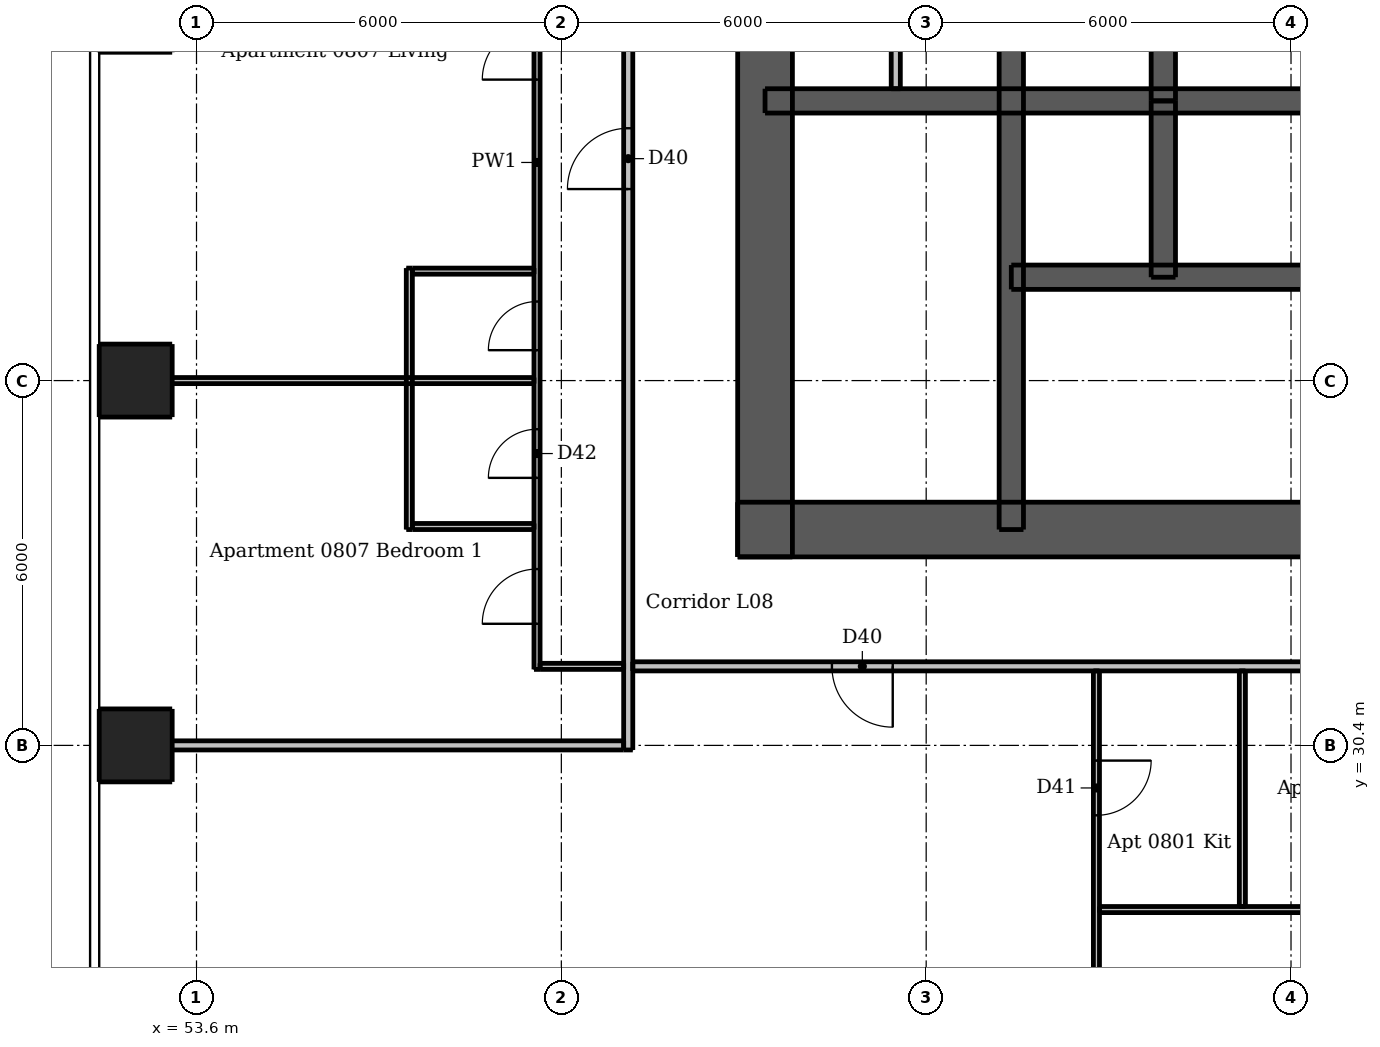
"""IFC4 building model, lengths in metres.
Left out: names, types, materials, properties, quantities, classifications, styles, units other than length and angle.
Written with IfcOpenShell. Run it as: python <this file> out.ifc"""

import sys

from ifc_helpers import new_model, si_unit, direction, frame, frame_2d, origin, origin_2d, place, context, subcontext, project, spatial, rectangle, extrude, element, fill, save


model = new_model("IFC4")
c1 = context("Model", 3, precision=1e-05, world=origin(), true_north=direction((0.0, 1.0)))
c2 = subcontext(c1, "Body", "Model", "MODEL_VIEW")
j1 = project(units=[si_unit("LENGTHUNIT", "METRE"), si_unit("PLANEANGLEUNIT", "RADIAN")], contexts=[c1])
p1 = place(None, origin())
s1 = spatial("IfcSite", under=j1, at=p1, CompositionType="ELEMENT")
p2 = place(p1, origin())
s2 = spatial("IfcBuilding", under=s1, at=p2, CompositionType="ELEMENT")
p3 = place(p2, frame((0.0, 0.0, 33.4)))
s3 = spatial("IfcBuildingStorey", under=s2, at=p3, CompositionType="ELEMENT", Elevation=33.4)
p4 = place(p3, frame((62.5, 33.95, 0.0), z_axis=(0.0, 0.0, 1.0), x_axis=(1.0, 0.0, 0.0)))
e1 = element("IfcWall", 1, at=p4, inside=s3, PredefinedType="SHEAR", context=c2, shape_type="SweptSolid", body=[
    extrude(rectangle(XDim=24.0, YDim=0.9, at=frame_2d((12.0, 0.0))), origin(), (0.0, 0.0, 1.0), 3.05),
])
p5 = place(p4, frame((2.05, 0.0, 0.0)))
e2 = element("IfcOpeningElement", 2, at=p5, cuts=e1, PredefinedType="OPENING", context=c2, shape_type="SweptSolid", body=[
    extrude(rectangle(XDim=1.1, YDim=2.1, at=frame_2d((0.55, 1.05))), frame((0.0, 0.46, 0.0), z_axis=(0.0, -1.0, 0.0), x_axis=(1.0, 0.0, 0.0)), (0.0, 0.0, 1.0), 0.92),
])
p6 = place(p4, frame((20.85, 0.0, 0.0)))
e3 = element("IfcOpeningElement", 3, at=p6, cuts=e1, PredefinedType="OPENING", context=c2, shape_type="SweptSolid", body=[
    extrude(rectangle(XDim=1.1, YDim=2.1, at=frame_2d((0.55, 1.05))), frame((0.0, 0.46, 0.0), z_axis=(0.0, -1.0, 0.0), x_axis=(1.0, 0.0, 0.0)), (0.0, 0.0, 1.0), 0.92),
])
p7 = place(p4, frame((8.0, 0.0, 0.0)))
e4 = element("IfcOpeningElement", 4, at=p7, cuts=e1, PredefinedType="OPENING", context=c2, shape_type="SweptSolid", body=[
    extrude(rectangle(XDim=1.1, YDim=2.1, at=frame_2d((0.55, 1.05))), frame((0.0, 0.46, 0.0), z_axis=(0.0, -1.0, 0.0), x_axis=(1.0, 0.0, 0.0)), (0.0, 0.0, 1.0), 0.92),
])
p8 = place(p4, frame((16.363, 0.0, 0.0)))
e5 = element("IfcOpeningElement", 5, at=p8, cuts=e1, PredefinedType="OPENING", context=c2, shape_type="SweptSolid", body=[
    extrude(rectangle(XDim=0.9, YDim=2.1, at=frame_2d((0.45, 1.05))), frame((0.0, 0.46, 0.0), z_axis=(0.0, -1.0, 0.0), x_axis=(1.0, 0.0, 0.0)), (0.0, 0.0, 1.0), 0.92),
])
p9 = place(p3, frame((62.95, 33.5, 0.0), z_axis=(0.0, 0.0, 1.0), x_axis=(0.0, 1.0, 0.0)))
e6 = element("IfcWall", 6, at=p9, inside=s3, PredefinedType="SHEAR", context=c2, shape_type="SweptSolid", body=[
    extrude(rectangle(XDim=24.0, YDim=0.9, at=frame_2d((12.0, 0.0))), origin(), (0.0, 0.0, 1.0), 3.05),
])
p10 = place(p9, frame((11.2, 0.0, 0.0)))
e7 = element("IfcOpeningElement", 7, at=p10, cuts=e6, PredefinedType="OPENING", context=c2, shape_type="SweptSolid", body=[
    extrude(rectangle(XDim=1.6, YDim=2.1, at=frame_2d((0.8, 1.05))), frame((0.0, 0.46, 0.0), z_axis=(0.0, -1.0, 0.0), x_axis=(1.0, 0.0, 0.0)), (0.0, 0.0, 1.0), 0.92),
])
p11 = place(p3, frame((62.95, 41.0, 0.0), z_axis=(0.0, 0.0, 1.0), x_axis=(1.0, 0.0, 0.0)))
e8 = element("IfcWall", 8, at=p11, inside=s3, PredefinedType="SHEAR", context=c2, shape_type="SweptSolid", body=[
    extrude(rectangle(XDim=23.1, YDim=0.4, at=frame_2d((11.55, 0.0))), origin(), (0.0, 0.0, 1.0), 3.05),
])
p12 = place(p3, frame((67.0, 33.95, 0.0), z_axis=(0.0, 0.0, 1.0), x_axis=(0.0, 1.0, 0.0)))
e9 = element("IfcWall", 9, at=p12, inside=s3, PredefinedType="SHEAR", context=c2, shape_type="SweptSolid", body=[
    extrude(rectangle(XDim=9.95, YDim=0.4, at=frame_2d((4.975, 0.0))), origin(), (0.0, 0.0, 1.0), 3.05),
])
p13 = place(p12, frame((0.65, 0.0, 0.0)))
e10 = element("IfcOpeningElement", 10, at=p13, cuts=e9, PredefinedType="OPENING", context=c2, shape_type="SweptSolid", body=[
    extrude(rectangle(XDim=1.1, YDim=2.1, at=frame_2d((0.55, 1.05))), frame((0.0, 0.21, 0.0), z_axis=(0.0, -1.0, 0.0), x_axis=(1.0, 0.0, 0.0)), (0.0, 0.0, 1.0), 0.42),
])
p14 = place(p3, frame((69.5, 41.0, 0.0), z_axis=(0.0, 0.0, 1.0), x_axis=(0.0, 1.0, 0.0)))
e11 = element("IfcWall", 11, at=p14, inside=s3, PredefinedType="SHEAR", context=c2, shape_type="SweptSolid", body=[
    extrude(rectangle(XDim=2.9, YDim=0.4, at=frame_2d((1.45, 0.0))), origin(), (0.0, 0.0, 1.0), 3.05),
])
p15 = place(p3, frame((67.0, 38.1, 0.0), z_axis=(0.0, 0.0, 1.0), x_axis=(1.0, 0.0, 0.0)))
e12 = element("IfcWall", 12, at=p15, inside=s3, PredefinedType="SHEAR", context=c2, shape_type="SweptSolid", body=[
    extrude(rectangle(XDim=7.5, YDim=0.4, at=frame_2d((3.75, 0.0))), origin(), (0.0, 0.0, 1.0), 3.05),
])
p16 = place(p15, frame((0.7, 0.0, 0.0)))
e13 = element("IfcOpeningElement", 13, at=p16, cuts=e12, PredefinedType="OPENING", context=c2, shape_type="SweptSolid", body=[
    extrude(rectangle(XDim=1.1, YDim=2.1, at=frame_2d((0.55, 1.05))), frame((0.0, 0.21, 0.0), z_axis=(0.0, -1.0, 0.0), x_axis=(1.0, 0.0, 0.0)), (0.0, 0.0, 1.0), 0.42),
])
p17 = place(p15, frame((3.2, 0.0, 0.0)))
e14 = element("IfcOpeningElement", 14, at=p17, cuts=e12, PredefinedType="OPENING", context=c2, shape_type="SweptSolid", body=[
    extrude(rectangle(XDim=1.1, YDim=2.1, at=frame_2d((0.55, 1.05))), frame((0.0, 0.21, 0.0), z_axis=(0.0, -1.0, 0.0), x_axis=(1.0, 0.0, 0.0)), (0.0, 0.0, 1.0), 0.42),
])
p18 = place(p15, frame((5.65, 0.0, 0.0)))
e15 = element("IfcOpeningElement", 15, at=p18, cuts=e12, PredefinedType="OPENING", context=c2, shape_type="SweptSolid", body=[
    extrude(rectangle(XDim=1.2, YDim=2.1, at=frame_2d((0.6, 1.05))), frame((0.0, 0.21, 0.0), z_axis=(0.0, -1.0, 0.0), x_axis=(1.0, 0.0, 0.0)), (0.0, 0.0, 1.0), 0.42),
])
p19 = place(p3, frame((69.5, 38.1, 0.0), z_axis=(0.0, 0.0, 1.0), x_axis=(0.0, 1.0, 0.0)))
e16 = element("IfcWall", 16, at=p19, inside=s3, PredefinedType="SHEAR", context=c2, shape_type="SweptSolid", body=[
    extrude(rectangle(XDim=2.9, YDim=0.4, at=frame_2d((1.45, 0.0))), origin(), (0.0, 0.0, 1.0), 3.05),
])
for number, where, z_axis, x_axis in (
    (17, (52.6, 30.4, 0.0), (0.0, 0.0, 1.0), (1.0, 0.0, 0.0)),
    (18, (52.6, 36.4, 0.0), (0.0, 0.0, 1.0), (1.0, 0.0, 0.0)),
    (19, (52.6, 42.4, 0.0), (0.0, 0.0, 1.0), (1.0, 0.0, 0.0)),
):
    element("IfcColumn", number, at=place(p3, frame(where, z_axis=z_axis, x_axis=x_axis)), inside=s3, PredefinedType="COLUMN", context=c2, shape_type="SweptSolid", body=[
        extrude(rectangle(XDim=1.2, YDim=1.2, at=origin_2d()), origin(), (0.0, 0.0, 1.0), 3.05),
    ])
p20 = place(p3, frame((65.1, 41.2, 0.0), z_axis=(0.0, 0.0, 1.0), x_axis=(0.0, 1.0, 0.0)))
e20 = element("IfcWall", 20, at=p20, inside=s3, PredefinedType="PLUMBINGWALL", context=c2, shape_type="SweptSolid", body=[
    extrude(rectangle(XDim=2.5, YDim=0.15, at=frame_2d((1.25, 0.0))), origin(), (0.0, 0.0, 1.0), 3.05),
])
p21 = place(p3, frame((57.1, 33.95, 0.0), z_axis=(0.0, 0.0, 1.0), x_axis=(0.0, 1.0, 0.0)))
e21 = element("IfcWall", 21, at=p21, inside=s3, PredefinedType="PARTITIONING", context=c2, shape_type="SweptSolid", body=[
    extrude(rectangle(XDim=4.3, YDim=0.1, at=frame_2d((2.15, 0.0))), origin(), (0.0, 0.0, 1.0), 3.05),
])
p22 = place(p3, frame((59.2, 31.65, 0.0), z_axis=(0.0, 0.0, 1.0), x_axis=(0.0, 1.0, 0.0)))
e22 = element("IfcWall", 22, at=p22, inside=s3, PredefinedType="PARTITIONING", context=c2, shape_type="SweptSolid", body=[
    extrude(rectangle(XDim=16.675, YDim=0.1, at=frame_2d((8.337, 0.0))), origin(), (0.0, 0.0, 1.0), 3.05),
])
p23 = place(p22, frame((9.7, 0.0, 0.0)))
e23 = element("IfcOpeningElement", 23, at=p23, cuts=e22, PredefinedType="OPENING", context=c2, shape_type="SweptSolid", body=[
    extrude(rectangle(XDim=0.9, YDim=2.1, at=frame_2d((0.45, 1.05))), frame((0.0, 0.06, 0.0), z_axis=(0.0, -1.0, 0.0), x_axis=(1.0, 0.0, 0.0)), (0.0, 0.0, 1.0), 0.12),
])
p24 = place(p22, frame((14.8, 0.0, 0.0)))
e24 = element("IfcOpeningElement", 24, at=p24, cuts=e22, PredefinedType="OPENING", context=c2, shape_type="SweptSolid", body=[
    extrude(rectangle(XDim=0.9, YDim=2.1, at=frame_2d((0.45, 1.05))), frame((0.0, 0.06, 0.0), z_axis=(0.0, -1.0, 0.0), x_axis=(1.0, 0.0, 0.0)), (0.0, 0.0, 1.0), 0.12),
])
p25 = place(p22, frame((5.25, 0.0, 0.0)))
e25 = element("IfcOpeningElement", 25, at=p25, cuts=e22, PredefinedType="OPENING", context=c2, shape_type="SweptSolid", body=[
    extrude(rectangle(XDim=0.8, YDim=2.1, at=frame_2d((0.4, 1.05))), frame((0.0, 0.06, 0.0), z_axis=(0.0, -1.0, 0.0), x_axis=(1.0, 0.0, 0.0)), (0.0, 0.0, 1.0), 0.12),
])
p26 = place(p22, frame((0.75, 0.0, 0.0)))
e26 = element("IfcOpeningElement", 26, at=p26, cuts=e22, PredefinedType="OPENING", context=c2, shape_type="SweptSolid", body=[
    extrude(rectangle(XDim=0.9, YDim=2.1, at=frame_2d((0.45, 1.05))), frame((0.0, 0.06, 0.0), z_axis=(0.0, -1.0, 0.0), x_axis=(1.0, 0.0, 0.0)), (0.0, 0.0, 1.0), 0.12),
])
p27 = place(p22, frame((3.15, 0.0, 0.0)))
e27 = element("IfcOpeningElement", 27, at=p27, cuts=e22, PredefinedType="OPENING", context=c2, shape_type="SweptSolid", body=[
    extrude(rectangle(XDim=0.8, YDim=2.1, at=frame_2d((0.4, 1.05))), frame((0.0, 0.06, 0.0), z_axis=(0.0, -1.0, 0.0), x_axis=(1.0, 0.0, 0.0)), (0.0, 0.0, 1.0), 0.12),
])
p28 = place(p3, frame((68.4, 31.625, 0.0), z_axis=(0.0, 0.0, 1.0), x_axis=(0.0, -1.0, 0.0)))
e28 = element("IfcWall", 28, at=p28, inside=s3, PredefinedType="PARTITIONING", context=c2, shape_type="SweptSolid", body=[
    extrude(rectangle(XDim=10.125, YDim=0.1, at=frame_2d((5.062, 0.0))), origin(), (0.0, 0.0, 1.0), 3.05),
])
p29 = place(p28, frame((1.475, 0.0, 0.0)))
e29 = element("IfcOpeningElement", 29, at=p29, cuts=e28, PredefinedType="OPENING", context=c2, shape_type="SweptSolid", body=[
    extrude(rectangle(XDim=0.9, YDim=2.1, at=frame_2d((0.45, 1.05))), frame((0.0, 0.06, 0.0), z_axis=(0.0, -1.0, 0.0), x_axis=(1.0, 0.0, 0.0)), (0.0, 0.0, 1.0), 0.12),
])
p30 = place(p28, frame((6.575, 0.0, 0.0)))
e30 = element("IfcOpeningElement", 30, at=p30, cuts=e28, PredefinedType="OPENING", context=c2, shape_type="SweptSolid", body=[
    extrude(rectangle(XDim=0.9, YDim=2.1, at=frame_2d((0.45, 1.05))), frame((0.0, 0.06, 0.0), z_axis=(0.0, -1.0, 0.0), x_axis=(1.0, 0.0, 0.0)), (0.0, 0.0, 1.0), 0.12),
])
p31 = place(p3, frame((70.8, 27.75, 0.0), z_axis=(0.0, 0.0, 1.0), x_axis=(0.0, 1.0, 0.0)))
e31 = element("IfcWall", 31, at=p31, inside=s3, PredefinedType="PARTITIONING", context=c2, shape_type="SweptSolid", body=[
    extrude(rectangle(XDim=3.875, YDim=0.1, at=frame_2d((1.938, 0.0))), origin(), (0.0, 0.0, 1.0), 3.05),
])
p32 = place(p3, frame((57.15, 38.2, 0.0), z_axis=(0.0, 0.0, 1.0), x_axis=(1.0, 0.0, 0.0)))
e32 = element("IfcWall", 32, at=p32, inside=s3, PredefinedType="PARTITIONING", context=c2, shape_type="SweptSolid", body=[
    extrude(rectangle(XDim=2.0, YDim=0.1, at=frame_2d((1.0, 0.0))), origin(), (0.0, 0.0, 1.0), 3.05),
])
p33 = place(p3, frame((52.0, 36.4, 0.0), z_axis=(0.0, 0.0, 1.0), x_axis=(1.0, 0.0, 0.0)))
e33 = element("IfcWall", 33, at=p33, inside=s3, PredefinedType="PARTITIONING", context=c2, shape_type="SweptSolid", body=[
    extrude(rectangle(XDim=7.15, YDim=0.1, at=frame_2d((3.575, 0.0))), origin(), (0.0, 0.0, 1.0), 2.516),
])
p34 = place(p3, frame((57.15, 34.0, 0.0), z_axis=(0.0, 0.0, 1.0), x_axis=(1.0, 0.0, 0.0)))
e34 = element("IfcWall", 34, at=p34, inside=s3, PredefinedType="PARTITIONING", context=c2, shape_type="SweptSolid", body=[
    extrude(rectangle(XDim=2.0, YDim=0.1, at=frame_2d((1.0, 0.0))), origin(), (0.0, 0.0, 1.0), 3.05),
])
p35 = place(p3, frame((59.25, 31.7, 0.0), z_axis=(0.0, 0.0, 1.0), x_axis=(1.0, 0.0, 0.0)))
e35 = element("IfcWall", 35, at=p35, inside=s3, PredefinedType="PARTITIONING", context=c2, shape_type="SweptSolid", body=[
    extrude(rectangle(XDim=1.375, YDim=0.1, at=frame_2d((0.688, 0.0))), origin(), (0.0, 0.0, 1.0), 3.05),
])
p36 = place(p3, frame((68.45, 27.7, 0.0), z_axis=(0.0, 0.0, 1.0), x_axis=(1.0, 0.0, 0.0)))
e36 = element("IfcWall", 36, at=p36, inside=s3, PredefinedType="PARTITIONING", context=c2, shape_type="SweptSolid", body=[
    extrude(rectangle(XDim=6.075, YDim=0.1, at=frame_2d((3.038, 0.0))), origin(), (0.0, 0.0, 1.0), 3.05),
])
p37 = place(p36, frame((3.85, 0.0, 0.0)))
e37 = element("IfcOpeningElement", 37, at=p37, cuts=e36, PredefinedType="OPENING", context=c2, shape_type="SweptSolid", body=[
    extrude(rectangle(XDim=0.8, YDim=2.1, at=frame_2d((0.4, 1.05))), frame((0.0, 0.06, 0.0), z_axis=(0.0, -1.0, 0.0), x_axis=(1.0, 0.0, 0.0)), (0.0, 0.0, 1.0), 0.12),
])
p38 = place(p3, frame((60.7, 30.325, 0.0), z_axis=(0.0, 0.0, 1.0), x_axis=(0.0, 1.0, 0.0)))
e38 = element("IfcWall", 38, at=p38, inside=s3, PredefinedType="PARTITIONING", context=c2, shape_type="SweptSolid", body=[
    extrude(rectangle(XDim=28.9, YDim=0.15, at=frame_2d((14.45, 0.0))), origin(), (0.0, 0.0, 1.0), 3.05),
])
p39 = place(p38, frame((9.225, 0.0, 0.0)))
e39 = element("IfcOpeningElement", 39, at=p39, cuts=e38, PredefinedType="OPENING", context=c2, shape_type="SweptSolid", body=[
    extrude(rectangle(XDim=1.0, YDim=2.1, at=frame_2d((0.5, 1.05))), frame((0.0, 0.085, 0.0), z_axis=(0.0, -1.0, 0.0), x_axis=(1.0, 0.0, 0.0)), (0.0, 0.0, 1.0), 0.17),
])
p40 = place(p38, frame((26.025, 0.0, 0.0)))
e40 = element("IfcOpeningElement", 40, at=p40, cuts=e38, PredefinedType="OPENING", context=c2, shape_type="SweptSolid", body=[
    extrude(rectangle(XDim=1.0, YDim=2.1, at=frame_2d((0.5, 1.05))), frame((0.0, 0.085, 0.0), z_axis=(0.0, -1.0, 0.0), x_axis=(1.0, 0.0, 0.0)), (0.0, 0.0, 1.0), 0.17),
])
p41 = place(p3, frame((89.525, 31.7, 0.0), z_axis=(0.0, 0.0, 1.0), x_axis=(-1.0, 0.0, 0.0)))
e41 = element("IfcWall", 41, at=p41, inside=s3, PredefinedType="PARTITIONING", context=c2, shape_type="SweptSolid", body=[
    extrude(rectangle(XDim=28.75, YDim=0.15, at=frame_2d((14.375, 0.0))), origin(), (0.0, 0.0, 1.0), 3.05),
])
p42 = place(p41, frame((24.475, 0.0, 0.0)))
e42 = element("IfcOpeningElement", 42, at=p42, cuts=e41, PredefinedType="OPENING", context=c2, shape_type="SweptSolid", body=[
    extrude(rectangle(XDim=1.0, YDim=2.1, at=frame_2d((0.5, 1.05))), frame((0.0, 0.085, 0.0), z_axis=(0.0, -1.0, 0.0), x_axis=(1.0, 0.0, 0.0)), (0.0, 0.0, 1.0), 0.17),
])
p43 = place(p41, frame((7.575, 0.0, 0.0)))
e43 = element("IfcOpeningElement", 43, at=p43, cuts=e41, PredefinedType="OPENING", context=c2, shape_type="SweptSolid", body=[
    extrude(rectangle(XDim=1.0, YDim=2.1, at=frame_2d((0.5, 1.05))), frame((0.0, 0.085, 0.0), z_axis=(0.0, -1.0, 0.0), x_axis=(1.0, 0.0, 0.0)), (0.0, 0.0, 1.0), 0.17),
])
p44 = place(p3, frame((52.0, 30.4, 0.0), z_axis=(0.0, 0.0, 1.0), x_axis=(1.0, 0.0, 0.0)))
e44 = element("IfcWall", 44, at=p44, inside=s3, PredefinedType="PARTITIONING", context=c2, shape_type="SweptSolid", body=[
    extrude(rectangle(XDim=8.625, YDim=0.15, at=frame_2d((4.312, 0.0))), origin(), (0.0, 0.0, 1.0), 2.647),
])
p45 = place(p5, origin())
e45 = element("IfcDoor", 45, at=p45, inside=s3, OperationType="SINGLE_SWING_LEFT", PredefinedType="DOOR", context=c2, shape_type="SweptSolid", body=[
    extrude(rectangle(XDim=1.1, YDim=2.1, at=frame_2d((0.55, 1.05))), frame((0.0, 0.438, 0.0), z_axis=(0.0, -1.0, 0.0), x_axis=(1.0, 0.0, 0.0)), (0.0, 0.0, 1.0), 0.05),
])
fill(e2, e45)
p46 = place(p7, origin())
e46 = element("IfcDoor", 46, at=p46, inside=s3, OperationType="SINGLE_SWING_LEFT", PredefinedType="DOOR", context=c2, shape_type="SweptSolid", body=[
    extrude(rectangle(XDim=1.1, YDim=2.1, at=frame_2d((0.55, 1.05))), frame((0.0, 0.438, 0.0), z_axis=(0.0, -1.0, 0.0), x_axis=(1.0, 0.0, 0.0)), (0.0, 0.0, 1.0), 0.05),
])
fill(e4, e46)
p47 = place(p13, origin())
e47 = element("IfcDoor", 47, at=p47, inside=s3, OperationType="SINGLE_SWING_RIGHT", PredefinedType="DOOR", context=c2, shape_type="SweptSolid", body=[
    extrude(rectangle(XDim=1.1, YDim=2.1, at=frame_2d((0.55, 1.05))), frame((0.0, -0.138, 0.0), z_axis=(0.0, -1.0, 0.0), x_axis=(1.0, 0.0, 0.0)), (0.0, 0.0, 1.0), 0.05),
])
fill(e10, e47)
p48 = place(p16, origin())
e48 = element("IfcDoor", 48, at=p48, inside=s3, OperationType="DOUBLE_DOOR_SLIDING", PredefinedType="DOOR", context=c2, shape_type="SweptSolid", body=[
    extrude(rectangle(XDim=1.1, YDim=2.1, at=frame_2d((0.55, 1.05))), frame((0.0, 0.025, 0.0), z_axis=(0.0, -1.0, 0.0), x_axis=(1.0, 0.0, 0.0)), (0.0, 0.0, 1.0), 0.05),
])
fill(e13, e48)
p49 = place(p17, origin())
e49 = element("IfcDoor", 49, at=p49, inside=s3, OperationType="DOUBLE_DOOR_SLIDING", PredefinedType="DOOR", context=c2, shape_type="SweptSolid", body=[
    extrude(rectangle(XDim=1.1, YDim=2.1, at=frame_2d((0.55, 1.05))), frame((0.0, 0.025, 0.0), z_axis=(0.0, -1.0, 0.0), x_axis=(1.0, 0.0, 0.0)), (0.0, 0.0, 1.0), 0.05),
])
fill(e14, e49)
p50 = place(p42, origin())
e50 = element("IfcDoor", 50, at=p50, inside=s3, OperationType="SINGLE_SWING_LEFT", PredefinedType="DOOR", context=c2, shape_type="SweptSolid", body=[
    extrude(rectangle(XDim=1.0, YDim=2.1, at=frame_2d((0.5, 1.05))), frame((0.0, 0.025, 0.0), z_axis=(0.0, -1.0, 0.0), x_axis=(1.0, 0.0, 0.0)), (0.0, 0.0, 1.0), 0.05),
])
fill(e42, e50)
p51 = place(p29, origin())
e51 = element("IfcDoor", 51, at=p51, inside=s3, OperationType="SINGLE_SWING_LEFT", PredefinedType="DOOR", context=c2, shape_type="SweptSolid", body=[
    extrude(rectangle(XDim=0.9, YDim=2.1, at=frame_2d((0.45, 1.05))), frame((0.0, 0.025, 0.0), z_axis=(0.0, -1.0, 0.0), x_axis=(1.0, 0.0, 0.0)), (0.0, 0.0, 1.0), 0.05),
])
fill(e29, e51)
p52 = place(p39, origin())
e52 = element("IfcDoor", 52, at=p52, inside=s3, OperationType="SINGLE_SWING_LEFT", PredefinedType="DOOR", context=c2, shape_type="SweptSolid", body=[
    extrude(rectangle(XDim=1.0, YDim=2.1, at=frame_2d((0.5, 1.05))), frame((0.0, 0.025, 0.0), z_axis=(0.0, -1.0, 0.0), x_axis=(1.0, 0.0, 0.0)), (0.0, 0.0, 1.0), 0.05),
])
fill(e39, e52)
p53 = place(p23, origin())
e53 = element("IfcDoor", 53, at=p53, inside=s3, OperationType="SINGLE_SWING_LEFT", PredefinedType="DOOR", context=c2, shape_type="SweptSolid", body=[
    extrude(rectangle(XDim=0.9, YDim=2.1, at=frame_2d((0.45, 1.05))), frame((0.0, 0.025, 0.0), z_axis=(0.0, -1.0, 0.0), x_axis=(1.0, 0.0, 0.0)), (0.0, 0.0, 1.0), 0.05),
])
fill(e23, e53)
p54 = place(p25, origin())
e54 = element("IfcDoor", 54, at=p54, inside=s3, OperationType="SINGLE_SWING_LEFT", PredefinedType="DOOR", context=c2, shape_type="SweptSolid", body=[
    extrude(rectangle(XDim=0.8, YDim=2.1, at=frame_2d((0.4, 1.05))), frame((0.0, 0.025, 0.0), z_axis=(0.0, -1.0, 0.0), x_axis=(1.0, 0.0, 0.0)), (0.0, 0.0, 1.0), 0.05),
])
fill(e25, e54)
p55 = place(p26, origin())
e55 = element("IfcDoor", 55, at=p55, inside=s3, OperationType="SINGLE_SWING_LEFT", PredefinedType="DOOR", context=c2, shape_type="SweptSolid", body=[
    extrude(rectangle(XDim=0.9, YDim=2.1, at=frame_2d((0.45, 1.05))), frame((0.0, 0.025, 0.0), z_axis=(0.0, -1.0, 0.0), x_axis=(1.0, 0.0, 0.0)), (0.0, 0.0, 1.0), 0.05),
])
fill(e26, e55)
p56 = place(p27, origin())
e56 = element("IfcDoor", 56, at=p56, inside=s3, OperationType="SINGLE_SWING_LEFT", PredefinedType="DOOR", context=c2, shape_type="SweptSolid", body=[
    extrude(rectangle(XDim=0.8, YDim=2.1, at=frame_2d((0.4, 1.05))), frame((0.0, 0.025, 0.0), z_axis=(0.0, -1.0, 0.0), x_axis=(1.0, 0.0, 0.0)), (0.0, 0.0, 1.0), 0.05),
])
fill(e27, e56)
save(model, sys.argv[1])
